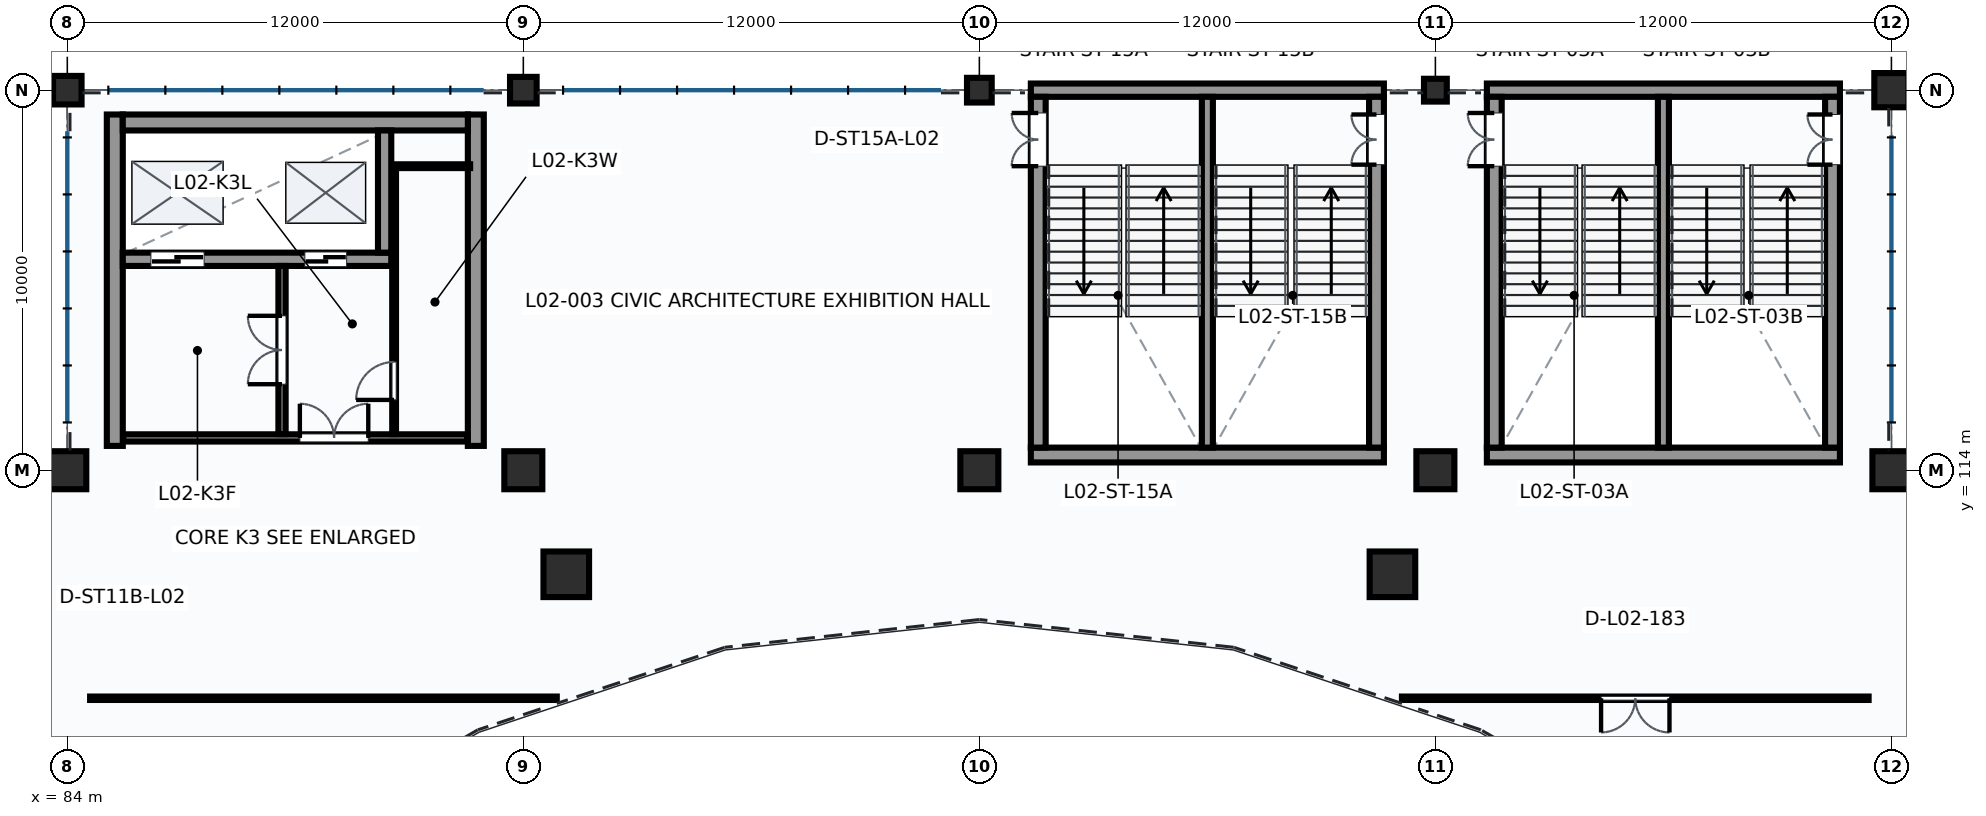
"""IFC4 building model, lengths in metres.
Left out: names, types, materials, properties, quantities, classifications, styles, units other than length and angle.
Written with IfcOpenShell. Run it as: python <this file> out.ifc"""

import sys

from ifc_helpers import new_model, si_unit, direction, frame, frame_2d, origin, origin_2d, place, context, subcontext, project, spatial, rectangle, circle, extrude, element, fill, save


model = new_model("IFC4")
c1 = context("Model", 3, precision=1e-05, world=origin(), true_north=direction((0.0, 1.0)))
c2 = subcontext(c1, "Body", "Model", "MODEL_VIEW")
j1 = project(units=[si_unit("LENGTHUNIT", "METRE"), si_unit("PLANEANGLEUNIT", "RADIAN")], contexts=[c1])
p1 = place(None, origin())
s1 = spatial("IfcSite", under=j1, at=p1, CompositionType="ELEMENT")
p2 = place(p1, origin())
s2 = spatial("IfcBuilding", under=s1, at=p2, CompositionType="ELEMENT")
p3 = place(p2, frame((0.0, 0.0, 10.2)))
s3 = spatial("IfcBuildingStorey", under=s2, at=p3, CompositionType="ELEMENT", Elevation=10.2)
p4 = place(p3, frame((84.0, 114.0, 0.0), z_axis=(0.0, 0.0, 1.0), x_axis=(1.0, 0.0, 0.0)))
e1 = element("IfcColumn", 1, at=p4, inside=s3, PredefinedType="COLUMN", context=c2, shape_type="SweptSolid", body=[
    extrude(rectangle(XDim=1.0, YDim=1.0, at=origin_2d()), origin(), (0.0, 0.0, 1.0), 4.5),
])
p5 = place(p3, frame((84.0, 124.0, 0.0), z_axis=(0.0, 0.0, 1.0), x_axis=(1.0, 0.0, 0.0)))
e2 = element("IfcColumn", 2, at=p5, inside=s3, PredefinedType="COLUMN", context=c2, shape_type="SweptSolid", body=[
    extrude(rectangle(XDim=0.75, YDim=0.75, at=origin_2d()), origin(), (0.0, 0.0, 1.0), 4.5),
])
p6 = place(p3, frame((96.0, 114.0, 0.0), z_axis=(0.0, 0.0, 1.0), x_axis=(1.0, 0.0, 0.0)))
e3 = element("IfcColumn", 3, at=p6, inside=s3, PredefinedType="COLUMN", context=c2, shape_type="SweptSolid", body=[
    extrude(rectangle(XDim=1.0, YDim=1.0, at=origin_2d()), origin(), (0.0, 0.0, 1.0), 4.5),
])
p7 = place(p3, frame((96.0, 124.0, 0.0), z_axis=(0.0, 0.0, 1.0), x_axis=(1.0, 0.0, 0.0)))
e4 = element("IfcColumn", 4, at=p7, inside=s3, PredefinedType="COLUMN", context=c2, shape_type="SweptSolid", body=[
    extrude(rectangle(XDim=0.7, YDim=0.7, at=origin_2d()), origin(), (0.0, 0.0, 1.0), 4.5),
])
p8 = place(p3, frame((108.0, 114.0, 0.0), z_axis=(0.0, 0.0, 1.0), x_axis=(1.0, 0.0, 0.0)))
e5 = element("IfcColumn", 5, at=p8, inside=s3, PredefinedType="COLUMN", context=c2, shape_type="SweptSolid", body=[
    extrude(rectangle(XDim=1.0, YDim=1.0, at=origin_2d()), origin(), (0.0, 0.0, 1.0), 4.5),
])
p9 = place(p3, frame((108.0, 124.0, 0.0), z_axis=(0.0, 0.0, 1.0), x_axis=(1.0, 0.0, 0.0)))
e6 = element("IfcColumn", 6, at=p9, inside=s3, PredefinedType="COLUMN", context=c2, shape_type="SweptSolid", body=[
    extrude(rectangle(XDim=0.65, YDim=0.65, at=origin_2d()), origin(), (0.0, 0.0, 1.0), 4.5),
])
p10 = place(p3, frame((120.0, 114.0, 0.0), z_axis=(0.0, 0.0, 1.0), x_axis=(1.0, 0.0, 0.0)))
e7 = element("IfcColumn", 7, at=p10, inside=s3, PredefinedType="COLUMN", context=c2, shape_type="SweptSolid", body=[
    extrude(rectangle(XDim=1.0, YDim=1.0, at=origin_2d()), origin(), (0.0, 0.0, 1.0), 4.5),
])
p11 = place(p3, frame((120.0, 124.0, 0.0), z_axis=(0.0, 0.0, 1.0), x_axis=(1.0, 0.0, 0.0)))
e8 = element("IfcColumn", 8, at=p11, inside=s3, PredefinedType="COLUMN", context=c2, shape_type="SweptSolid", body=[
    extrude(rectangle(XDim=0.6, YDim=0.6, at=origin_2d()), origin(), (0.0, 0.0, 1.0), 4.5),
])
p12 = place(p3, frame((132.0, 114.0, 0.0), z_axis=(0.0, 0.0, 1.0), x_axis=(1.0, 0.0, 0.0)))
e9 = element("IfcColumn", 9, at=p12, inside=s3, PredefinedType="COLUMN", context=c2, shape_type="SweptSolid", body=[
    extrude(rectangle(XDim=1.0, YDim=1.0, at=origin_2d()), origin(), (0.0, 0.0, 1.0), 4.5),
])
p13 = place(p3, frame((132.0, 124.0, 0.0), z_axis=(0.0, 0.0, 1.0), x_axis=(1.0, 0.0, 0.0)))
e10 = element("IfcColumn", 10, at=p13, inside=s3, PredefinedType="COLUMN", context=c2, shape_type="SweptSolid", body=[
    extrude(circle(Radius=0.45, at=origin_2d()), origin(), (0.0, 0.0, 1.0), 4.5),
])
for number, where, z_axis, x_axis in (
    (11, (118.87, 111.262, 0.0), (0.0, 0.0, 1.0), (1.0, 0.0, 0.0)),
    (12, (97.13, 111.262, 0.0), (0.0, 0.0, 1.0), (1.0, 0.0, 0.0)),
):
    element("IfcColumn", number, at=place(p3, frame(where, z_axis=z_axis, x_axis=x_axis)), inside=s3, PredefinedType="COLUMN", context=c2, shape_type="SweptSolid", body=[
        extrude(rectangle(XDim=1.2, YDim=1.2, at=origin_2d()), origin(), (0.0, 0.0, 1.0), 4.5),
    ])
p14 = place(p3, frame((121.355, 114.4, 0.0), z_axis=(0.0, 0.0, 1.0), x_axis=(1.0, 0.0, 0.0)))
e13 = element("IfcWall", 13, at=p14, inside=s3, PredefinedType="SHEAR", context=c2, shape_type="SweptSolid", body=[
    extrude(rectangle(XDim=9.29, YDim=0.39, at=frame_2d((4.645, 0.0))), origin(), (0.0, 0.0, 1.0), 4.5),
])
p15 = place(p3, frame((121.355, 124.0, 0.0), z_axis=(0.0, 0.0, 1.0), x_axis=(1.0, 0.0, 0.0)))
e14 = element("IfcWall", 14, at=p15, inside=s3, PredefinedType="SHEAR", context=c2, shape_type="SweptSolid", body=[
    extrude(rectangle(XDim=9.29, YDim=0.35, at=frame_2d((4.645, 0.0))), origin(), (0.0, 0.0, 1.0), 3.586),
])
p16 = place(p3, frame((121.55, 114.595, 0.0), z_axis=(0.0, 0.0, 1.0), x_axis=(0.0, 1.0, 0.0)))
e15 = element("IfcWall", 15, at=p16, inside=s3, PredefinedType="SHEAR", context=c2, shape_type="SweptSolid", body=[
    extrude(rectangle(XDim=9.23, YDim=0.39, at=frame_2d((4.615, 0.0))), origin(), (0.0, 0.0, 1.0), 4.5),
])
p17 = place(p16, frame((7.405, 0.0, 0.0)))
e16 = element("IfcOpeningElement", 16, at=p17, cuts=e15, PredefinedType="OPENING", context=c2, shape_type="SweptSolid", body=[
    extrude(rectangle(XDim=1.4, YDim=2.2, at=frame_2d((0.7, 1.1))), frame((0.0, 0.205, 0.0), z_axis=(0.0, -1.0, 0.0), x_axis=(1.0, 0.0, 0.0)), (0.0, 0.0, 1.0), 0.41),
])
p18 = place(p3, frame((130.45, 114.595, 0.0), z_axis=(0.0, 0.0, 1.0), x_axis=(0.0, 1.0, 0.0)))
e17 = element("IfcWall", 17, at=p18, inside=s3, PredefinedType="SHEAR", context=c2, shape_type="SweptSolid", body=[
    extrude(rectangle(XDim=9.23, YDim=0.39, at=frame_2d((4.615, 0.0))), origin(), (0.0, 0.0, 1.0), 4.5),
])
p19 = place(p18, frame((7.445, 0.0, 0.0)))
e18 = element("IfcOpeningElement", 18, at=p19, cuts=e17, PredefinedType="OPENING", context=c2, shape_type="SweptSolid", body=[
    extrude(rectangle(XDim=1.32, YDim=2.2, at=frame_2d((0.66, 1.1))), frame((0.0, 0.205, 0.0), z_axis=(0.0, -1.0, 0.0), x_axis=(1.0, 0.0, 0.0)), (0.0, 0.0, 1.0), 0.41),
])
p20 = place(p3, frame((126.0, 114.595, 0.0), z_axis=(0.0, 0.0, 1.0), x_axis=(0.0, 1.0, 0.0)))
e19 = element("IfcWall", 19, at=p20, inside=s3, PredefinedType="SHEAR", context=c2, shape_type="SweptSolid", body=[
    extrude(rectangle(XDim=9.23, YDim=0.29, at=frame_2d((4.615, 0.0))), origin(), (0.0, 0.0, 1.0), 4.5),
])
p21 = place(p3, frame((109.355, 114.4, 0.0), z_axis=(0.0, 0.0, 1.0), x_axis=(1.0, 0.0, 0.0)))
e20 = element("IfcWall", 20, at=p21, inside=s3, PredefinedType="SHEAR", context=c2, shape_type="SweptSolid", body=[
    extrude(rectangle(XDim=9.29, YDim=0.39, at=frame_2d((4.645, 0.0))), origin(), (0.0, 0.0, 1.0), 4.5),
])
p22 = place(p3, frame((109.355, 124.0, 0.0), z_axis=(0.0, 0.0, 1.0), x_axis=(1.0, 0.0, 0.0)))
e21 = element("IfcWall", 21, at=p22, inside=s3, PredefinedType="SHEAR", context=c2, shape_type="SweptSolid", body=[
    extrude(rectangle(XDim=9.29, YDim=0.35, at=frame_2d((4.645, 0.0))), origin(), (0.0, 0.0, 1.0), 3.437),
])
p23 = place(p3, frame((109.55, 114.595, 0.0), z_axis=(0.0, 0.0, 1.0), x_axis=(0.0, 1.0, 0.0)))
e22 = element("IfcWall", 22, at=p23, inside=s3, PredefinedType="SHEAR", context=c2, shape_type="SweptSolid", body=[
    extrude(rectangle(XDim=9.23, YDim=0.39, at=frame_2d((4.615, 0.0))), origin(), (0.0, 0.0, 1.0), 4.5),
])
p24 = place(p23, frame((7.405, 0.0, 0.0)))
e23 = element("IfcOpeningElement", 23, at=p24, cuts=e22, PredefinedType="OPENING", context=c2, shape_type="SweptSolid", body=[
    extrude(rectangle(XDim=1.4, YDim=2.2, at=frame_2d((0.7, 1.1))), frame((0.0, 0.205, 0.0), z_axis=(0.0, -1.0, 0.0), x_axis=(1.0, 0.0, 0.0)), (0.0, 0.0, 1.0), 0.41),
])
p25 = place(p3, frame((118.45, 114.595, 0.0), z_axis=(0.0, 0.0, 1.0), x_axis=(0.0, 1.0, 0.0)))
e24 = element("IfcWall", 24, at=p25, inside=s3, PredefinedType="SHEAR", context=c2, shape_type="SweptSolid", body=[
    extrude(rectangle(XDim=9.23, YDim=0.39, at=frame_2d((4.615, 0.0))), origin(), (0.0, 0.0, 1.0), 4.5),
])
p26 = place(p25, frame((7.445, 0.0, 0.0)))
e25 = element("IfcOpeningElement", 25, at=p26, cuts=e24, PredefinedType="OPENING", context=c2, shape_type="SweptSolid", body=[
    extrude(rectangle(XDim=1.32, YDim=2.2, at=frame_2d((0.66, 1.1))), frame((0.0, 0.205, 0.0), z_axis=(0.0, -1.0, 0.0), x_axis=(1.0, 0.0, 0.0)), (0.0, 0.0, 1.0), 0.41),
])
p27 = place(p3, frame((114.0, 114.595, 0.0), z_axis=(0.0, 0.0, 1.0), x_axis=(0.0, 1.0, 0.0)))
e26 = element("IfcWall", 26, at=p27, inside=s3, PredefinedType="SHEAR", context=c2, shape_type="SweptSolid", body=[
    extrude(rectangle(XDim=9.23, YDim=0.29, at=frame_2d((4.615, 0.0))), origin(), (0.0, 0.0, 1.0), 4.5),
])
for number, where, z_axis, x_axis in (
    (27, (85.25, 114.64, 0.0), (0.0, 0.0, 1.0), (0.0, 1.0, 0.0)),
    (28, (94.75, 114.64, 0.0), (0.0, 0.0, 1.0), (0.0, 1.0, 0.0)),
):
    element("IfcWall", number, at=place(p3, frame(where, z_axis=z_axis, x_axis=x_axis)), inside=s3, PredefinedType="SHEAR", context=c2, shape_type="SweptSolid", body=[
        extrude(rectangle(XDim=8.72, YDim=0.42, at=frame_2d((4.36, 0.0))), origin(), (0.0, 0.0, 1.0), 4.5),
    ])
p28 = place(p3, frame((85.46, 123.15, 0.0), z_axis=(0.0, 0.0, 1.0), x_axis=(1.0, 0.0, 0.0)))
e29 = element("IfcWall", 29, at=p28, inside=s3, PredefinedType="SHEAR", context=c2, shape_type="SweptSolid", body=[
    extrude(rectangle(XDim=9.08, YDim=0.42, at=frame_2d((4.54, 0.0))), origin(), (0.0, 0.0, 1.0), 4.5),
])
p29 = place(p3, frame((85.46, 119.55, 0.0), z_axis=(0.0, 0.0, 1.0), x_axis=(1.0, 0.0, 0.0)))
e30 = element("IfcWall", 30, at=p29, inside=s3, PredefinedType="SHEAR", context=c2, shape_type="SweptSolid", body=[
    extrude(rectangle(XDim=7.065, YDim=0.35, at=frame_2d((3.532, 0.0))), origin(), (0.0, 0.0, 1.0), 4.5),
])
p30 = place(p29, frame((0.74, 0.0, 0.0)))
e31 = element("IfcOpeningElement", 31, at=p30, cuts=e30, PredefinedType="OPENING", context=c2, shape_type="SweptSolid", body=[
    extrude(rectangle(XDim=1.4, YDim=2.3, at=frame_2d((0.7, 1.15))), frame((0.0, 0.185, 0.0), z_axis=(0.0, -1.0, 0.0), x_axis=(1.0, 0.0, 0.0)), (0.0, 0.0, 1.0), 0.37),
])
p31 = place(p29, frame((4.79, 0.0, 0.0)))
e32 = element("IfcOpeningElement", 32, at=p31, cuts=e30, PredefinedType="OPENING", context=c2, shape_type="SweptSolid", body=[
    extrude(rectangle(XDim=1.1, YDim=2.2, at=frame_2d((0.55, 1.1))), frame((0.0, 0.185, 0.0), z_axis=(0.0, -1.0, 0.0), x_axis=(1.0, 0.0, 0.0)), (0.0, 0.0, 1.0), 0.37),
])
p32 = place(p3, frame((92.35, 119.725, 0.0), z_axis=(0.0, 0.0, 1.0), x_axis=(0.0, 1.0, 0.0)))
e33 = element("IfcWall", 33, at=p32, inside=s3, PredefinedType="SHEAR", context=c2, shape_type="SweptSolid", body=[
    extrude(rectangle(XDim=3.215, YDim=0.35, at=frame_2d((1.607, 0.0))), origin(), (0.0, 0.0, 1.0), 4.5),
])
p33 = place(p3, frame((85.47, 114.85, 0.0), z_axis=(0.0, 0.0, 1.0), x_axis=(1.0, 0.0, 0.0)))
e34 = element("IfcWall", 34, at=p33, inside=s3, PredefinedType="PARTITIONING", context=c2, shape_type="SweptSolid", body=[
    extrude(rectangle(XDim=9.06, YDim=0.19, at=frame_2d((4.53, 0.0))), origin(), (0.0, 0.0, 1.0), 4.15),
])
p34 = place(p33, frame((4.65, 0.0, 0.0)))
e35 = element("IfcOpeningElement", 35, at=p34, cuts=e34, PredefinedType="OPENING", context=c2, shape_type="SweptSolid", body=[
    extrude(rectangle(XDim=1.8, YDim=2.3, at=frame_2d((0.9, 1.15))), frame((0.0, 0.105, 0.0), z_axis=(0.0, -1.0, 0.0), x_axis=(1.0, 0.0, 0.0)), (0.0, 0.0, 1.0), 0.21),
])
p35 = place(p3, frame((89.65, 114.95, 0.0), z_axis=(0.0, 0.0, 1.0), x_axis=(0.0, 1.0, 0.0)))
e36 = element("IfcWall", 36, at=p35, inside=s3, PredefinedType="PARTITIONING", context=c2, shape_type="SweptSolid", body=[
    extrude(rectangle(XDim=4.425, YDim=0.19, at=frame_2d((2.212, 0.0))), origin(), (0.0, 0.0, 1.0), 4.15),
])
p36 = place(p35, frame((1.313, 0.0, 0.0)))
e37 = element("IfcOpeningElement", 37, at=p36, cuts=e36, PredefinedType="OPENING", context=c2, shape_type="SweptSolid", body=[
    extrude(rectangle(XDim=1.8, YDim=2.2, at=frame_2d((0.9, 1.1))), frame((0.0, 0.105, 0.0), z_axis=(0.0, -1.0, 0.0), x_axis=(1.0, 0.0, 0.0)), (0.0, 0.0, 1.0), 0.21),
])
p37 = place(p3, frame((92.6, 114.95, 0.0), z_axis=(0.0, 0.0, 1.0), x_axis=(0.0, 1.0, 0.0)))
e38 = element("IfcWall", 38, at=p37, inside=s3, PredefinedType="PARTITIONING", context=c2, shape_type="SweptSolid", body=[
    extrude(rectangle(XDim=7.05, YDim=0.1, at=frame_2d((3.525, 0.0))), origin(), (0.0, 0.0, 1.0), 4.15),
])
p38 = place(p37, frame((0.9, 0.0, 0.0)))
e39 = element("IfcOpeningElement", 39, at=p38, cuts=e38, PredefinedType="OPENING", context=c2, shape_type="SweptSolid", body=[
    extrude(rectangle(XDim=1.0, YDim=2.1, at=frame_2d((0.5, 1.05))), frame((0.0, 0.06, 0.0), z_axis=(0.0, -1.0, 0.0), x_axis=(1.0, 0.0, 0.0)), (0.0, 0.0, 1.0), 0.12),
])
p39 = place(p3, frame((92.6, 122.0, 0.0), z_axis=(0.0, 0.0, 1.0), x_axis=(1.0, 0.0, 0.0)))
e40 = element("IfcWall", 40, at=p39, inside=s3, PredefinedType="PARTITIONING", context=c2, shape_type="SweptSolid", body=[
    extrude(rectangle(XDim=2.0, YDim=0.1, at=frame_2d((1.0, 0.0))), origin(), (0.0, 0.0, 1.0), 4.15),
])
p40 = place(p3, frame((131.4, 108.0, 0.0), z_axis=(0.0, 0.0, 1.0), x_axis=(-1.0, 0.0, 0.0)))
e41 = element("IfcWall", 41, at=p40, inside=s3, PredefinedType="PARTITIONING", context=c2, shape_type="SweptSolid", body=[
    extrude(rectangle(XDim=12.28, YDim=0.09, at=frame_2d((6.14, 0.0))), origin(), (0.0, 0.0, 1.0), 4.15),
])
p41 = place(p40, frame((5.24, 0.0, 0.0)))
e42 = element("IfcOpeningElement", 42, at=p41, cuts=e41, PredefinedType="OPENING", context=c2, shape_type="SweptSolid", body=[
    extrude(rectangle(XDim=1.8, YDim=2.3, at=frame_2d((0.9, 1.15))), frame((0.0, 0.055, 0.0), z_axis=(0.0, -1.0, 0.0), x_axis=(1.0, 0.0, 0.0)), (0.0, 0.0, 1.0), 0.11),
])
p42 = place(p3, frame((96.88, 108.0, 0.0), z_axis=(0.0, 0.0, 1.0), x_axis=(-1.0, 0.0, 0.0)))
e43 = element("IfcWall", 43, at=p42, inside=s3, PredefinedType="PARTITIONING", context=c2, shape_type="SweptSolid", body=[
    extrude(rectangle(XDim=12.28, YDim=0.09, at=frame_2d((6.14, 0.0))), origin(), (0.0, 0.0, 1.0), 4.15),
])
p43 = place(p17, frame((1.4, 0.0, 0.0), z_axis=(0.0, 0.0, 1.0), x_axis=(-1.0, 0.0, 0.0)))
e44 = element("IfcDoor", 44, at=p43, inside=s3, OperationType="DOUBLE_DOOR_SINGLE_SWING", PredefinedType="DOOR", context=c2, shape_type="SweptSolid", body=[
    extrude(rectangle(XDim=1.4, YDim=2.2, at=frame_2d((0.7, 1.1))), frame((0.0, 0.025, 0.0), z_axis=(0.0, -1.0, 0.0), x_axis=(1.0, 0.0, 0.0)), (0.0, 0.0, 1.0), 0.05),
])
fill(e16, e44)
p44 = place(p19, origin())
e45 = element("IfcDoor", 45, at=p44, inside=s3, OperationType="DOUBLE_DOOR_SINGLE_SWING", PredefinedType="DOOR", context=c2, shape_type="SweptSolid", body=[
    extrude(rectangle(XDim=1.32, YDim=2.2, at=frame_2d((0.66, 1.1))), frame((0.0, 0.025, 0.0), z_axis=(0.0, -1.0, 0.0), x_axis=(1.0, 0.0, 0.0)), (0.0, 0.0, 1.0), 0.05),
])
fill(e18, e45)
p45 = place(p24, frame((1.4, 0.0, 0.0), z_axis=(0.0, 0.0, 1.0), x_axis=(-1.0, 0.0, 0.0)))
e46 = element("IfcDoor", 46, at=p45, inside=s3, OperationType="DOUBLE_DOOR_SINGLE_SWING", PredefinedType="DOOR", context=c2, shape_type="SweptSolid", body=[
    extrude(rectangle(XDim=1.4, YDim=2.2, at=frame_2d((0.7, 1.1))), frame((0.0, 0.025, 0.0), z_axis=(0.0, -1.0, 0.0), x_axis=(1.0, 0.0, 0.0)), (0.0, 0.0, 1.0), 0.05),
])
fill(e23, e46)
p46 = place(p26, origin())
e47 = element("IfcDoor", 47, at=p46, inside=s3, OperationType="DOUBLE_DOOR_SINGLE_SWING", PredefinedType="DOOR", context=c2, shape_type="SweptSolid", body=[
    extrude(rectangle(XDim=1.32, YDim=2.2, at=frame_2d((0.66, 1.1))), frame((0.0, 0.025, 0.0), z_axis=(0.0, -1.0, 0.0), x_axis=(1.0, 0.0, 0.0)), (0.0, 0.0, 1.0), 0.05),
])
fill(e25, e47)
p47 = place(p30, origin())
e48 = element("IfcDoor", 48, at=p47, inside=s3, OperationType="SLIDING_TO_LEFT", PredefinedType="DOOR", context=c2, shape_type="SweptSolid", body=[
    extrude(rectangle(XDim=1.4, YDim=2.3, at=frame_2d((0.7, 1.15))), frame((0.0, 0.025, 0.0), z_axis=(0.0, -1.0, 0.0), x_axis=(1.0, 0.0, 0.0)), (0.0, 0.0, 1.0), 0.05),
])
fill(e31, e48)
p48 = place(p31, origin())
e49 = element("IfcDoor", 49, at=p48, inside=s3, OperationType="SLIDING_TO_LEFT", PredefinedType="DOOR", context=c2, shape_type="SweptSolid", body=[
    extrude(rectangle(XDim=1.1, YDim=2.2, at=frame_2d((0.55, 1.1))), frame((0.0, 0.025, 0.0), z_axis=(0.0, -1.0, 0.0), x_axis=(1.0, 0.0, 0.0)), (0.0, 0.0, 1.0), 0.05),
])
fill(e32, e49)
p49 = place(p34, origin())
e50 = element("IfcDoor", 50, at=p49, inside=s3, OperationType="DOUBLE_DOOR_SINGLE_SWING", PredefinedType="DOOR", context=c2, shape_type="SweptSolid", body=[
    extrude(rectangle(XDim=1.8, YDim=2.3, at=frame_2d((0.9, 1.15))), frame((0.0, 0.025, 0.0), z_axis=(0.0, -1.0, 0.0), x_axis=(1.0, 0.0, 0.0)), (0.0, 0.0, 1.0), 0.05),
])
fill(e35, e50)
p50 = place(p36, origin())
e51 = element("IfcDoor", 51, at=p50, inside=s3, OperationType="DOUBLE_DOOR_SINGLE_SWING", PredefinedType="DOOR", context=c2, shape_type="SweptSolid", body=[
    extrude(rectangle(XDim=1.8, YDim=2.2, at=frame_2d((0.9, 1.1))), frame((0.0, 0.025, 0.0), z_axis=(0.0, -1.0, 0.0), x_axis=(1.0, 0.0, 0.0)), (0.0, 0.0, 1.0), 0.05),
])
fill(e37, e51)
p51 = place(p38, origin())
e52 = element("IfcDoor", 52, at=p51, inside=s3, OperationType="SINGLE_SWING_LEFT", PredefinedType="DOOR", context=c2, shape_type="SweptSolid", body=[
    extrude(rectangle(XDim=1.0, YDim=2.1, at=frame_2d((0.5, 1.05))), frame((0.0, 0.025, 0.0), z_axis=(0.0, -1.0, 0.0), x_axis=(1.0, 0.0, 0.0)), (0.0, 0.0, 1.0), 0.05),
])
fill(e39, e52)
p52 = place(p41, origin())
e53 = element("IfcDoor", 53, at=p52, inside=s3, OperationType="DOUBLE_DOOR_SINGLE_SWING", PredefinedType="DOOR", context=c2, shape_type="SweptSolid", body=[
    extrude(rectangle(XDim=1.8, YDim=2.3, at=frame_2d((0.9, 1.15))), frame((0.0, 0.025, 0.0), z_axis=(0.0, -1.0, 0.0), x_axis=(1.0, 0.0, 0.0)), (0.0, 0.0, 1.0), 0.05),
])
fill(e42, e53)
save(model, sys.argv[1])
